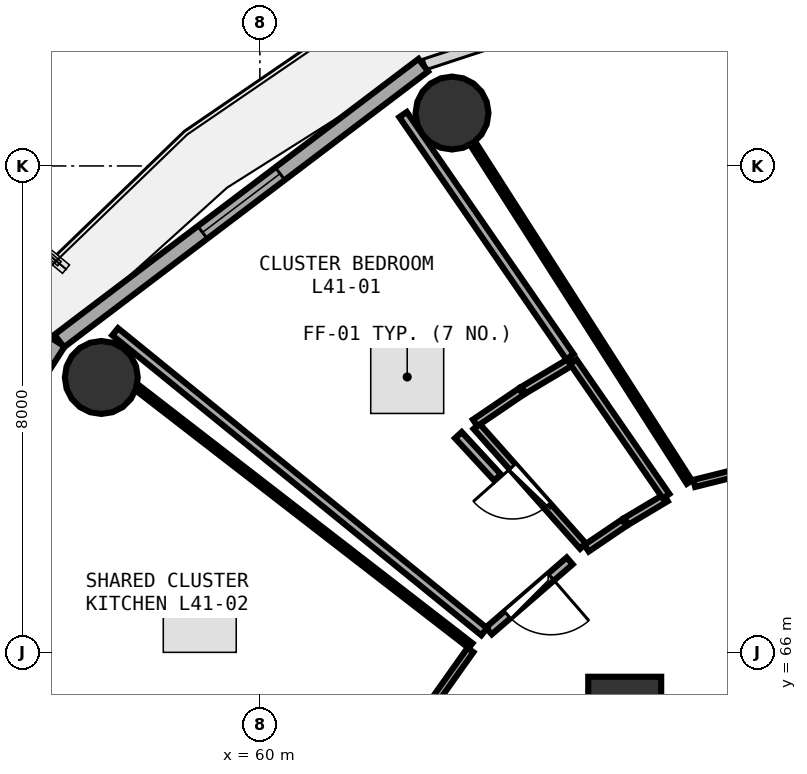
"""IFC4 building model, lengths in metres.
Left out: names, types, materials, properties, quantities, classifications, styles, units other than length and angle.
Written with IfcOpenShell. Run it as: python <this file> out.ifc"""

import sys

from ifc_helpers import new_model, si_unit, direction, frame, frame_2d, origin, origin_2d, place, context, subcontext, project, spatial, rectangle, circle, extrude, element, fill, save


model = new_model("IFC4")
c1 = context("Model", 3, precision=1e-05, world=origin(), true_north=direction((0.0, 1.0)))
c2 = subcontext(c1, "Body", "Model", "MODEL_VIEW")
j1 = project(units=[si_unit("LENGTHUNIT", "METRE"), si_unit("PLANEANGLEUNIT", "RADIAN")], contexts=[c1])
p1 = place(None, origin())
s1 = spatial("IfcSite", under=j1, at=p1, CompositionType="ELEMENT")
p2 = place(p1, origin())
s2 = spatial("IfcBuilding", under=s1, at=p2, CompositionType="ELEMENT")
p3 = place(p2, frame((0.0, 0.0, 161.85)))
s3 = spatial("IfcBuildingStorey", under=s2, at=p3, CompositionType="ELEMENT", Elevation=161.85)
p4 = place(p3, frame((66.0, 65.0, 0.0), z_axis=(0.0, 0.0, 1.0), x_axis=(1.0, 0.0, 0.0)))
e1 = element("IfcColumn", 1, at=p4, inside=s3, PredefinedType="PILASTER", context=c2, shape_type="SweptSolid", body=[
    extrude(rectangle(XDim=1.2, YDim=1.2, at=origin_2d()), origin(), (0.0, 0.0, 1.0), 3.75),
])
for number, where, z_axis, x_axis in (
    (2, (63.16, 74.87, 0.0), (0.0, 0.0, 1.0), (1.0, 0.0, 0.0)),
    (3, (57.392, 70.521, 0.0), (0.0, 0.0, 1.0), (1.0, 0.0, 0.0)),
):
    element("IfcColumn", number, at=place(p3, frame(where, z_axis=z_axis, x_axis=x_axis)), inside=s3, PredefinedType="COLUMN", context=c2, shape_type="SweptSolid", body=[
        extrude(circle(Radius=0.6, at=origin_2d()), origin(), (0.0, 0.0, 1.0), 3.75),
    ])
p5 = place(p3, frame((62.688, 75.658, 0.0), z_axis=(0.0, 0.0, 1.0), x_axis=(-0.797163719609, -0.603763202042, 0.0)))
e4 = element("IfcWall", 4, at=p5, inside=s3, PredefinedType="SOLIDWALL", context=c2, shape_type="SweptSolid", body=[
    extrude(rectangle(XDim=7.512, YDim=0.26, at=frame_2d((3.756, 0.0))), origin(), (0.0, 0.0, 1.0), 3.475),
])
p6 = place(p5, frame((2.956, 0.0, 0.85)))
e5 = element("IfcOpeningElement", 5, at=p6, cuts=e4, PredefinedType="OPENING", context=c2, shape_type="SweptSolid", body=[
    extrude(rectangle(XDim=1.6, YDim=1.45, at=frame_2d((0.8, 0.725))), frame((0.0, 0.14, 0.0), z_axis=(0.0, -1.0, 0.0), x_axis=(1.0, 0.0, 0.0)), (0.0, 0.0, 1.0), 0.28),
])
p7 = place(p3, frame((56.679, 71.1, 0.0), z_axis=(0.0, 0.0, 1.0), x_axis=(-0.538801521808, -0.842432739213, 0.0)))
e6 = element("IfcWall", 6, at=p7, inside=s3, PredefinedType="SOLIDWALL", context=c2, shape_type="SweptSolid", body=[
    extrude(rectangle(XDim=7.253, YDim=0.26, at=frame_2d((3.627, 0.0))), origin(), (0.0, 0.0, 1.0), 3.475),
])
p8 = place(p7, frame((3.152, 0.0, 0.0)))
e7 = element("IfcOpeningElement", 7, at=p8, cuts=e6, PredefinedType="OPENING", context=c2, shape_type="SweptSolid", body=[
    extrude(rectangle(XDim=0.95, YDim=2.1, at=frame_2d((0.475, 1.05))), frame((0.0, 0.14, 0.0), z_axis=(0.0, -1.0, 0.0), x_axis=(1.0, 0.0, 0.0)), (0.0, 0.0, 1.0), 0.28),
])
p9 = place(p7, frame((1.572, 0.0, 0.85)))
e8 = element("IfcOpeningElement", 8, at=p9, cuts=e6, PredefinedType="OPENING", context=c2, shape_type="SweptSolid", body=[
    extrude(rectangle(XDim=1.2, YDim=1.45, at=frame_2d((0.6, 0.725))), frame((0.0, 0.14, 0.0), z_axis=(0.0, -1.0, 0.0), x_axis=(1.0, 0.0, 0.0)), (0.0, 0.0, 1.0), 0.28),
])
p10 = place(p3, frame((73.701, 70.414, 0.0), z_axis=(0.0, 0.0, 1.0), x_axis=(-0.970327101986, -0.241796019718, 0.0)))
e9 = element("IfcWall", 9, at=p10, inside=s3, PredefinedType="PARTITIONING", context=c2, shape_type="SweptSolid", body=[
    extrude(rectangle(XDim=6.758, YDim=0.12, at=frame_2d((3.379, 0.0))), origin(), (0.0, 0.0, 1.0), 2.975),
])
p11 = place(p10, frame((2.929, 0.0, 0.0)))
e10 = element("IfcOpeningElement", 10, at=p11, cuts=e9, PredefinedType="OPENING", context=c2, shape_type="SweptSolid", body=[
    extrude(rectangle(XDim=0.9, YDim=2.08, at=frame_2d((0.45, 1.04))), frame((0.0, 0.07, 0.0), z_axis=(0.0, -1.0, 0.0), x_axis=(1.0, 0.0, 0.0)), (0.0, 0.0, 1.0), 0.14),
])
p12 = place(p3, frame((65.315, 67.747, 0.0), z_axis=(0.0, 0.0, 1.0), x_axis=(-0.664185753234, 0.74756757902, 0.0)))
e11 = element("IfcWall", 11, at=p12, inside=s3, PredefinedType="PLUMBINGWALL", context=c2, shape_type="SweptSolid", body=[
    extrude(rectangle(XDim=2.638, YDim=0.13, at=frame_2d((1.319, 0.0))), origin(), (0.0, 0.0, 1.0), 2.975),
])
p13 = place(p12, frame((0.889, 0.0, 0.0)))
e12 = element("IfcOpeningElement", 12, at=p13, cuts=e11, PredefinedType="OPENING", context=c2, shape_type="SweptSolid", body=[
    extrude(rectangle(XDim=0.86, YDim=2.05, at=frame_2d((0.43, 1.025))), frame((0.0, 0.075, 0.0), z_axis=(0.0, -1.0, 0.0), x_axis=(1.0, 0.0, 0.0)), (0.0, 0.0, 1.0), 0.15),
])
p14 = place(p3, frame((65.094, 67.505, 0.0), z_axis=(0.0, 0.0, 1.0), x_axis=(-0.756110527693, -0.654443939472, 0.0)))
e13 = element("IfcWall", 13, at=p14, inside=s3, PredefinedType="PARTITIONING", context=c2, shape_type="SweptSolid", body=[
    extrude(rectangle(XDim=1.758, YDim=0.15, at=frame_2d((0.879, 0.0))), origin(), (0.0, 0.0, 1.0), 2.975),
])
p15 = place(p14, frame((0.404, 0.0, 0.0)))
e14 = element("IfcOpeningElement", 14, at=p15, cuts=e13, PredefinedType="OPENING", context=c2, shape_type="SweptSolid", body=[
    extrude(rectangle(XDim=0.95, YDim=2.08, at=frame_2d((0.475, 1.04))), frame((0.0, 0.085, 0.0), z_axis=(0.0, -1.0, 0.0), x_axis=(1.0, 0.0, 0.0)), (0.0, 0.0, 1.0), 0.17),
])
p16 = place(p3, frame((63.462, 66.038, 0.0), z_axis=(0.0, 0.0, 1.0), x_axis=(-0.578762045024, -0.815496471629, 0.0)))
e15 = element("IfcWall", 15, at=p16, inside=s3, PredefinedType="PARTITIONING", context=c2, shape_type="SweptSolid", body=[
    extrude(rectangle(XDim=3.483, YDim=0.12, at=frame_2d((1.741, 0.0))), origin(), (0.0, 0.0, 1.0), 2.975),
])
p17 = place(p16, frame((1.291, 0.0, 0.0)))
e16 = element("IfcOpeningElement", 16, at=p17, cuts=e15, PredefinedType="OPENING", context=c2, shape_type="SweptSolid", body=[
    extrude(rectangle(XDim=0.9, YDim=2.08, at=frame_2d((0.45, 1.04))), frame((0.0, 0.07, 0.0), z_axis=(0.0, -1.0, 0.0), x_axis=(1.0, 0.0, 0.0)), (0.0, 0.0, 1.0), 0.14),
])
p18 = place(p3, frame((67.063, 68.799, 0.0), z_axis=(0.0, 0.0, 1.0), x_axis=(-0.538644897025, 0.842532892479, 0.0)))
e17 = element("IfcWall", 17, at=p18, inside=s3, PredefinedType="PARTITIONING", context=c2, shape_type="SweptSolid", body=[
    extrude(rectangle(XDim=6.594, YDim=0.1, at=frame_2d((3.297, 0.0))), origin(), (0.0, 0.0, 1.0), 3.175),
])
p19 = place(p3, frame((66.675, 68.543, 0.0), z_axis=(0.0, 0.0, 1.0), x_axis=(-0.85851758599, -0.5127841208, 0.0)))
e18 = element("IfcWall", 18, at=p19, inside=s3, PredefinedType="PLUMBINGWALL", context=c2, shape_type="SweptSolid", body=[
    extrude(rectangle(XDim=0.756, YDim=0.13, at=frame_2d((0.378, 0.0))), origin(), (0.0, 0.0, 1.0), 3.48),
])
p20 = place(p3, frame((65.992, 68.134, 0.0), z_axis=(0.0, 0.0, 1.0), x_axis=(-0.82786992474, -0.560920125964, 0.0)))
e19 = element("IfcWall", 19, at=p20, inside=s3, PredefinedType="PLUMBINGWALL", context=c2, shape_type="SweptSolid", body=[
    extrude(rectangle(XDim=0.75, YDim=0.13, at=frame_2d((0.375, 0.0))), origin(), (0.0, 0.0, 1.0), 2.975),
])
p21 = place(p3, frame((63.54, 69.775, 0.0), z_axis=(0.0, 0.0, 1.0), x_axis=(0.827440475962, 0.561553433558, 0.0)))
e20 = element("IfcWall", 20, at=p21, inside=s3, PredefinedType="PLUMBINGWALL", context=c2, shape_type="SweptSolid", body=[
    extrude(rectangle(XDim=0.918, YDim=0.13, at=frame_2d((0.459, 0.0))), origin(), (0.0, 0.0, 1.0), 2.975),
])
p22 = place(p3, frame((64.333, 70.312, 0.0), z_axis=(0.0, 0.0, 1.0), x_axis=(0.858494754448, 0.512822344077, 0.0)))
e21 = element("IfcWall", 21, at=p22, inside=s3, PredefinedType="PLUMBINGWALL", context=c2, shape_type="SweptSolid", body=[
    extrude(rectangle(XDim=0.923, YDim=0.13, at=frame_2d((0.461, 0.0))), origin(), (0.0, 0.0, 1.0), 2.975),
])
p23 = place(p3, frame((65.154, 70.78, 0.0), z_axis=(0.0, 0.0, 1.0), x_axis=(0.568302093988, -0.822819986369, 0.0)))
e22 = element("IfcWall", 22, at=p23, inside=s3, PredefinedType="PLUMBINGWALL", context=c2, shape_type="SweptSolid", body=[
    extrude(rectangle(XDim=2.686, YDim=0.13, at=frame_2d((1.343, 0.0))), origin(), (0.0, 0.0, 1.0), 3.235),
])
p24 = place(p3, frame((63.689, 66.34, 0.0), z_axis=(0.0, 0.0, 1.0), x_axis=(-0.77600992695, 0.630720693553, 0.0)))
e23 = element("IfcWall", 23, at=p24, inside=s3, PredefinedType="PARTITIONING", context=c2, shape_type="SweptSolid", body=[
    extrude(rectangle(XDim=7.822, YDim=0.15, at=frame_2d((3.911, 0.0))), origin(), (0.0, 0.0, 1.0), 2.975),
])
p25 = place(p3, frame((62.355, 74.845, 0.0), z_axis=(0.0, 0.0, 1.0), x_axis=(0.56747106095, -0.823393341596, 0.0)))
e24 = element("IfcWall", 24, at=p25, inside=s3, PredefinedType="PARTITIONING", context=c2, shape_type="SweptSolid", body=[
    extrude(rectangle(XDim=4.837, YDim=0.15, at=frame_2d((2.418, 0.0))), origin(), (0.0, 0.0, 1.0), 2.975),
])
p26 = place(p3, frame((63.264, 69.573, 0.0), z_axis=(0.0, 0.0, 1.0), x_axis=(0.678771543933, -0.734349502041, 0.0)))
e25 = element("IfcWall", 25, at=p26, inside=s3, PredefinedType="PARTITIONING", context=c2, shape_type="SweptSolid", body=[
    extrude(rectangle(XDim=0.949, YDim=0.15, at=frame_2d((0.474, 0.0))), origin(), (0.0, 0.0, 1.0), 3.48),
])
p27 = place(p3, frame((61.375, 63.164, 0.0), z_axis=(0.0, 0.0, 1.0), x_axis=(-0.924943940784, 0.380103546953, 0.0)))
e26 = element("IfcWall", 26, at=p27, inside=s3, PredefinedType="PARTITIONING", context=c2, shape_type="SweptSolid", body=[
    extrude(rectangle(XDim=8.038, YDim=0.1, at=frame_2d((4.019, 0.0))), origin(), (0.0, 0.0, 1.0), 2.975),
])
p28 = place(p3, frame((57.992, 70.346, 0.0), z_axis=(0.0, 0.0, 1.0), x_axis=(0.790939607083, -0.611894221207, 0.0)))
e27 = element("IfcWall", 27, at=p28, inside=s3, PredefinedType="PARTITIONING", context=c2, shape_type="SweptSolid", body=[
    extrude(rectangle(XDim=6.92, YDim=0.1, at=frame_2d((3.46, 0.0))), origin(), (0.0, 0.0, 1.0), 2.975),
])
p29 = place(p3, frame((53.723, 65.777, 0.0), z_axis=(0.0, 0.0, 1.0), x_axis=(0.933303856141, -0.359087610636, 0.0)))
e28 = element("IfcWall", 28, at=p29, inside=s3, PredefinedType="PARTITIONING", context=c2, shape_type="SweptSolid", body=[
    extrude(rectangle(XDim=5.125, YDim=0.15, at=frame_2d((2.562, 0.0))), origin(), (0.0, 0.0, 1.0), 2.975),
])
p30 = place(p6, origin())
e29 = element("IfcWindow", 29, at=p30, inside=s3, PartitioningType="SINGLE_PANEL", PredefinedType="WINDOW", context=c2, shape_type="SweptSolid", body=[
    extrude(rectangle(XDim=1.6, YDim=1.45, at=frame_2d((0.8, 0.725))), frame((0.0, 0.03, 0.0), z_axis=(0.0, -1.0, 0.0), x_axis=(1.0, 0.0, 0.0)), (0.0, 0.0, 1.0), 0.06),
])
fill(e5, e29)
p31 = place(p13, origin())
e30 = element("IfcDoor", 30, at=p31, inside=s3, OperationType="SINGLE_SWING_RIGHT", PredefinedType="DOOR", context=c2, shape_type="SweptSolid", body=[
    extrude(rectangle(XDim=0.86, YDim=2.05, at=frame_2d((0.43, 1.025))), frame((0.0, 0.025, 0.0), z_axis=(0.0, -1.0, 0.0), x_axis=(1.0, 0.0, 0.0)), (0.0, 0.0, 1.0), 0.05),
])
fill(e12, e30)
p32 = place(p15, origin())
e31 = element("IfcDoor", 31, at=p32, inside=s3, OperationType="SINGLE_SWING_LEFT", PredefinedType="DOOR", context=c2, shape_type="SweptSolid", body=[
    extrude(rectangle(XDim=0.95, YDim=2.08, at=frame_2d((0.475, 1.04))), frame((0.0, 0.025, 0.0), z_axis=(0.0, -1.0, 0.0), x_axis=(1.0, 0.0, 0.0)), (0.0, 0.0, 1.0), 0.05),
])
fill(e14, e31)
save(model, sys.argv[1])
